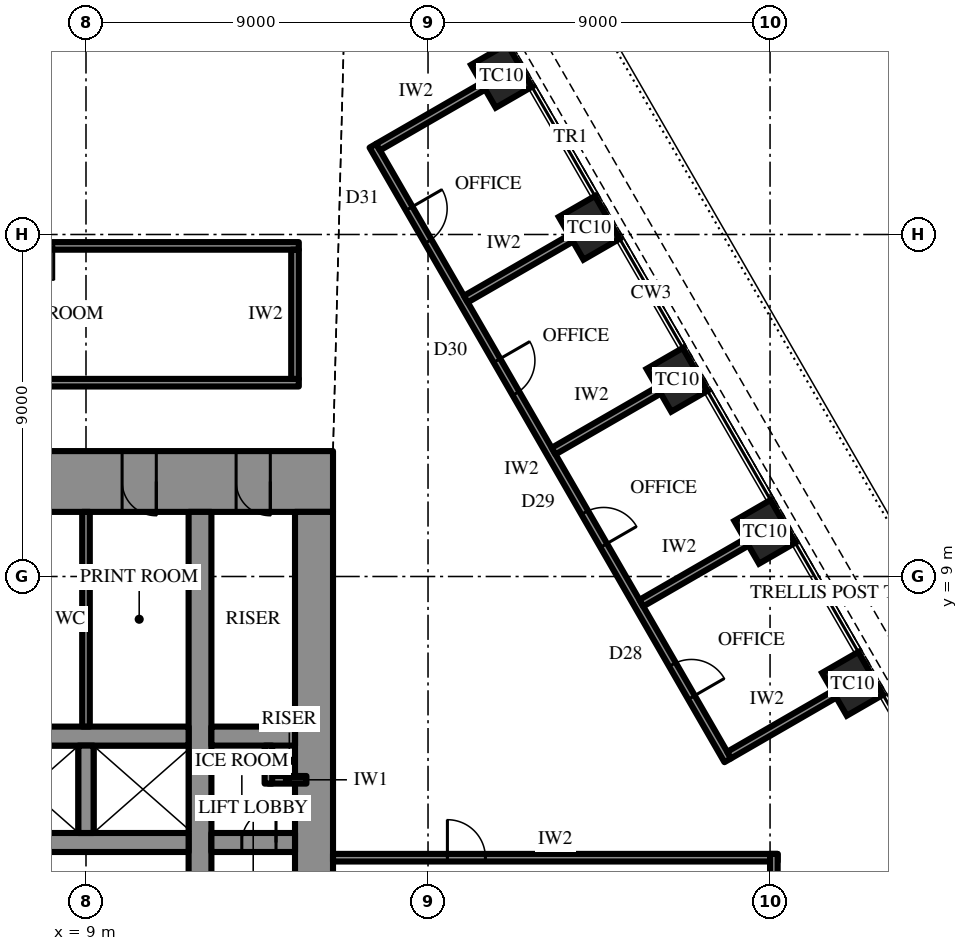
"""IFC4 building model, lengths in metres.
Left out: names, types, materials, properties, quantities, classifications, styles, units other than length and angle.
Written with IfcOpenShell. Run it as: python <this file> out.ifc"""

import sys

from ifc_helpers import new_model, si_unit, direction, frame, frame_2d, origin, origin_2d, place, context, subcontext, project, spatial, rectangle, extrude, element, fill, save


model = new_model("IFC4")
c1 = context("Model", 3, precision=1e-05, world=origin(), true_north=direction((0.0, 1.0)))
c2 = subcontext(c1, "Body", "Model", "MODEL_VIEW")
j1 = project(units=[si_unit("LENGTHUNIT", "METRE"), si_unit("PLANEANGLEUNIT", "RADIAN")], contexts=[c1])
p1 = place(None, origin())
s1 = spatial("IfcSite", under=j1, at=p1, CompositionType="ELEMENT")
p2 = place(p1, origin())
s2 = spatial("IfcBuilding", under=s1, at=p2, CompositionType="ELEMENT")
p3 = place(p2, frame((0.0, 0.0, 240.7)))
s3 = spatial("IfcBuildingStorey", under=s2, at=p3, CompositionType="ELEMENT", Elevation=240.7)
for number, where, z_axis, x_axis in (
    (1, (29.171, 6.175, 0.0), (0.0, 0.0, 1.0), (-0.5, 0.866, 0.0)),
    (2, (26.861, 10.175, 0.0), (0.0, 0.0, 1.0), (-0.5, 0.866, 0.0)),
    (3, (24.552, 14.175, 0.0), (0.0, 0.0, 1.0), (-0.5, 0.866, 0.0)),
    (4, (22.242, 18.175, 0.0), (0.0, 0.0, 1.0), (-0.5, 0.866, 0.0)),
    (5, (19.933, 22.175, 0.0), (0.0, 0.0, 1.0), (-0.5, 0.866, 0.0)),
):
    element("IfcColumn", number, at=place(p3, frame(where, z_axis=z_axis, x_axis=x_axis)), inside=s3, PredefinedType="COLUMN", context=c2, shape_type="SweptSolid", body=[
        extrude(rectangle(XDim=1.3, YDim=1.1, at=origin_2d()), origin(), (0.0, 0.0, 1.0), 4.2),
    ])
p4 = place(p3, frame((-15.5, 11.5, 0.0), z_axis=(0.0, 0.0, 1.0), x_axis=(1.0, 0.0, 0.0)))
e6 = element("IfcWall", 6, at=p4, inside=s3, PredefinedType="SHEAR", context=c2, shape_type="SweptSolid", body=[
    extrude(rectangle(XDim=31.0, YDim=1.6, at=frame_2d((15.5, 0.0))), origin(), (0.0, 0.0, 1.0), 4.2),
])
p5 = place(p4, frame((16.35, 0.0, 0.0)))
e7 = element("IfcOpeningElement", 7, at=p5, cuts=e6, PredefinedType="OPENING", context=c2, shape_type="SweptSolid", body=[
    extrude(rectangle(XDim=0.9, YDim=2.2, at=frame_2d((0.45, 1.1))), frame((0.0, 0.81, 0.0), z_axis=(0.0, -1.0, 0.0), x_axis=(1.0, 0.0, 0.0)), (0.0, 0.0, 1.0), 1.62),
])
p6 = place(p4, frame((19.35, 0.0, 0.0)))
e8 = element("IfcOpeningElement", 8, at=p6, cuts=e6, PredefinedType="OPENING", context=c2, shape_type="SweptSolid", body=[
    extrude(rectangle(XDim=0.9, YDim=2.2, at=frame_2d((0.45, 1.1))), frame((0.0, 0.81, 0.0), z_axis=(0.0, -1.0, 0.0), x_axis=(1.0, 0.0, 0.0)), (0.0, 0.0, 1.0), 1.62),
])
p7 = place(p4, frame((22.4, 0.0, 0.0)))
e9 = element("IfcOpeningElement", 9, at=p7, cuts=e6, PredefinedType="OPENING", context=c2, shape_type="SweptSolid", body=[
    extrude(rectangle(XDim=1.0, YDim=2.2, at=frame_2d((0.5, 1.1))), frame((0.0, 0.81, 0.0), z_axis=(0.0, -1.0, 0.0), x_axis=(1.0, 0.0, 0.0)), (0.0, 0.0, 1.0), 1.62),
])
p8 = place(p4, frame((1.65, 0.0, 0.0)))
e10 = element("IfcOpeningElement", 10, at=p8, cuts=e6, PredefinedType="OPENING", context=c2, shape_type="SweptSolid", body=[
    extrude(rectangle(XDim=0.9, YDim=2.2, at=frame_2d((0.45, 1.1))), frame((0.0, 0.81, 0.0), z_axis=(0.0, -1.0, 0.0), x_axis=(1.0, 0.0, 0.0)), (0.0, 0.0, 1.0), 1.62),
])
p9 = place(p4, frame((4.65, 0.0, 0.0)))
e11 = element("IfcOpeningElement", 11, at=p9, cuts=e6, PredefinedType="OPENING", context=c2, shape_type="SweptSolid", body=[
    extrude(rectangle(XDim=0.9, YDim=2.2, at=frame_2d((0.45, 1.1))), frame((0.0, 0.81, 0.0), z_axis=(0.0, -1.0, 0.0), x_axis=(1.0, 0.0, 0.0)), (0.0, 0.0, 1.0), 1.62),
])
p10 = place(p4, frame((25.45, 0.0, 0.0)))
e12 = element("IfcOpeningElement", 12, at=p10, cuts=e6, PredefinedType="OPENING", context=c2, shape_type="SweptSolid", body=[
    extrude(rectangle(XDim=0.9, YDim=2.2, at=frame_2d((0.45, 1.1))), frame((0.0, 0.81, 0.0), z_axis=(0.0, -1.0, 0.0), x_axis=(1.0, 0.0, 0.0)), (0.0, 0.0, 1.0), 1.62),
])
p11 = place(p4, frame((28.45, 0.0, 0.0)))
e13 = element("IfcOpeningElement", 13, at=p11, cuts=e6, PredefinedType="OPENING", context=c2, shape_type="SweptSolid", body=[
    extrude(rectangle(XDim=0.9, YDim=2.2, at=frame_2d((0.45, 1.1))), frame((0.0, 0.81, 0.0), z_axis=(0.0, -1.0, 0.0), x_axis=(1.0, 0.0, 0.0)), (0.0, 0.0, 1.0), 1.62),
])
p12 = place(p3, frame((15.0, -10.7, 0.0), z_axis=(0.0, 0.0, 1.0), x_axis=(0.0, 1.0, 0.0)))
e14 = element("IfcWall", 14, at=p12, inside=s3, PredefinedType="SHEAR", context=c2, shape_type="SweptSolid", body=[
    extrude(rectangle(XDim=21.4, YDim=1.0, at=frame_2d((10.7, 0.0))), origin(), (0.0, 0.0, 1.0), 4.2),
])
p13 = place(p12, frame((9.8, 0.0, 0.0)))
e15 = element("IfcOpeningElement", 15, at=p13, cuts=e14, PredefinedType="OPENING", context=c2, shape_type="SweptSolid", body=[
    extrude(rectangle(XDim=1.8, YDim=2.4, at=frame_2d((0.9, 1.2))), frame((0.0, 0.51, 0.0), z_axis=(0.0, -1.0, 0.0), x_axis=(1.0, 0.0, 0.0)), (0.0, 0.0, 1.0), 1.02),
])
p14 = place(p3, frame((12.0, -10.7, 0.0), z_axis=(0.0, 0.0, 1.0), x_axis=(0.0, 1.0, 0.0)))
e16 = element("IfcWall", 16, at=p14, inside=s3, PredefinedType="SHEAR", context=c2, shape_type="SweptSolid", body=[
    extrude(rectangle(XDim=21.4, YDim=0.6, at=frame_2d((10.7, 0.0))), origin(), (0.0, 0.0, 1.0), 4.2),
])
p15 = place(p14, frame((9.8, 0.0, 0.0)))
e17 = element("IfcOpeningElement", 17, at=p15, cuts=e16, PredefinedType="OPENING", context=c2, shape_type="SweptSolid", body=[
    extrude(rectangle(XDim=1.8, YDim=2.4, at=frame_2d((0.9, 1.2))), frame((0.0, 0.31, 0.0), z_axis=(0.0, -1.0, 0.0), x_axis=(1.0, 0.0, 0.0)), (0.0, 0.0, 1.0), 0.62),
])
p16 = place(p3, frame((-3.2, 2.0, 0.0), z_axis=(0.0, 0.0, 1.0), x_axis=(1.0, 0.0, 0.0)))
e18 = element("IfcWall", 18, at=p16, inside=s3, PredefinedType="SHEAR", context=c2, shape_type="SweptSolid", body=[
    extrude(rectangle(XDim=14.9, YDim=0.5, at=frame_2d((7.45, 0.0))), origin(), (0.0, 0.0, 1.0), 4.2),
])
p17 = place(p16, frame((1.15, 0.0, 0.0)))
e19 = element("IfcOpeningElement", 19, at=p17, cuts=e18, PredefinedType="OPENING", context=c2, shape_type="SweptSolid", body=[
    extrude(rectangle(XDim=1.1, YDim=2.2, at=frame_2d((0.55, 1.1))), frame((0.0, 0.26, 0.0), z_axis=(0.0, -1.0, 0.0), x_axis=(1.0, 0.0, 0.0)), (0.0, 0.0, 1.0), 0.52),
])
p18 = place(p16, frame((4.15, 0.0, 0.0)))
e20 = element("IfcOpeningElement", 20, at=p18, cuts=e18, PredefinedType="OPENING", context=c2, shape_type="SweptSolid", body=[
    extrude(rectangle(XDim=1.1, YDim=2.2, at=frame_2d((0.55, 1.1))), frame((0.0, 0.26, 0.0), z_axis=(0.0, -1.0, 0.0), x_axis=(1.0, 0.0, 0.0)), (0.0, 0.0, 1.0), 0.52),
])
p19 = place(p16, frame((7.15, 0.0, 0.0)))
e21 = element("IfcOpeningElement", 21, at=p19, cuts=e18, PredefinedType="OPENING", context=c2, shape_type="SweptSolid", body=[
    extrude(rectangle(XDim=1.1, YDim=2.2, at=frame_2d((0.55, 1.1))), frame((0.0, 0.26, 0.0), z_axis=(0.0, -1.0, 0.0), x_axis=(1.0, 0.0, 0.0)), (0.0, 0.0, 1.0), 0.52),
])
p20 = place(p16, frame((10.15, 0.0, 0.0)))
e22 = element("IfcOpeningElement", 22, at=p20, cuts=e18, PredefinedType="OPENING", context=c2, shape_type="SweptSolid", body=[
    extrude(rectangle(XDim=1.1, YDim=2.2, at=frame_2d((0.55, 1.1))), frame((0.0, 0.26, 0.0), z_axis=(0.0, -1.0, 0.0), x_axis=(1.0, 0.0, 0.0)), (0.0, 0.0, 1.0), 0.52),
])
p21 = place(p3, frame((12.3, 2.0, 0.0), z_axis=(0.0, 0.0, 1.0), x_axis=(1.0, 0.0, 0.0)))
e23 = element("IfcWall", 23, at=p21, inside=s3, PredefinedType="SHEAR", context=c2, shape_type="SweptSolid", body=[
    extrude(rectangle(XDim=2.2, YDim=0.5, at=frame_2d((1.1, 0.0))), origin(), (0.0, 0.0, 1.0), 4.2),
])
p22 = place(p21, frame((0.8, 0.0, 0.0)))
e24 = element("IfcOpeningElement", 24, at=p22, cuts=e23, PredefinedType="OPENING", context=c2, shape_type="SweptSolid", body=[
    extrude(rectangle(XDim=0.9, YDim=2.2, at=frame_2d((0.45, 1.1))), frame((0.0, 0.26, 0.0), z_axis=(0.0, -1.0, 0.0), x_axis=(1.0, 0.0, 0.0)), (0.0, 0.0, 1.0), 0.52),
])
p23 = place(p3, frame((-11.7, 4.8, 0.0), z_axis=(0.0, 0.0, 1.0), x_axis=(1.0, 0.0, 0.0)))
e25 = element("IfcWall", 25, at=p23, inside=s3, PredefinedType="SHEAR", context=c2, shape_type="SweptSolid", body=[
    extrude(rectangle(XDim=23.4, YDim=0.5, at=frame_2d((11.7, 0.0))), origin(), (0.0, 0.0, 1.0), 4.2),
])
p24 = place(p23, frame((6.6, 0.0, 0.0)))
e26 = element("IfcOpeningElement", 26, at=p24, cuts=e25, PredefinedType="OPENING", context=c2, shape_type="SweptSolid", body=[
    extrude(rectangle(XDim=1.2, YDim=2.2, at=frame_2d((0.6, 1.1))), frame((0.0, 0.26, 0.0), z_axis=(0.0, -1.0, 0.0), x_axis=(1.0, 0.0, 0.0)), (0.0, 0.0, 1.0), 0.52),
])
p25 = place(p23, frame((3.6, 0.0, 0.0)))
e27 = element("IfcOpeningElement", 27, at=p25, cuts=e25, PredefinedType="OPENING", context=c2, shape_type="SweptSolid", body=[
    extrude(rectangle(XDim=1.2, YDim=2.2, at=frame_2d((0.6, 1.1))), frame((0.0, 0.26, 0.0), z_axis=(0.0, -1.0, 0.0), x_axis=(1.0, 0.0, 0.0)), (0.0, 0.0, 1.0), 0.52),
])
p26 = place(p3, frame((12.3, 4.8, 0.0), z_axis=(0.0, 0.0, 1.0), x_axis=(1.0, 0.0, 0.0)))
e28 = element("IfcWall", 28, at=p26, inside=s3, PredefinedType="SHEAR", context=c2, shape_type="SweptSolid", body=[
    extrude(rectangle(XDim=2.2, YDim=0.5, at=frame_2d((1.1, 0.0))), origin(), (0.0, 0.0, 1.0), 4.2),
])
p27 = place(p3, frame((9.0, 2.25, 0.0), z_axis=(0.0, 0.0, 1.0), x_axis=(0.0, 1.0, 0.0)))
e29 = element("IfcWall", 29, at=p27, inside=s3, PredefinedType="SHEAR", context=c2, shape_type="SweptSolid", body=[
    extrude(rectangle(XDim=2.3, YDim=0.4, at=frame_2d((1.15, 0.0))), origin(), (0.0, 0.0, 1.0), 4.2),
])
p28 = place(p3, frame((9.0, 5.05, 0.0), z_axis=(0.0, 0.0, 1.0), x_axis=(0.0, 1.0, 0.0)))
e30 = element("IfcWall", 30, at=p28, inside=s3, PredefinedType="PARTITIONING", context=c2, shape_type="SweptSolid", body=[
    extrude(rectangle(XDim=5.65, YDim=0.2, at=frame_2d((2.825, 0.0))), origin(), (0.0, 0.0, 1.0), 4.0),
])
for number, where, z_axis, x_axis in (
    (31, (13.8, 3.65, 0.0), (0.0, 0.0, 1.0), (1.0, 0.0, 0.0)),
    (32, (13.8, 3.55, 0.0), (0.0, 0.0, 1.0), (0.0, 1.0, 0.0)),
):
    element("IfcWall", number, at=place(p3, frame(where, z_axis=z_axis, x_axis=x_axis)), inside=s3, PredefinedType="PARTITIONING", context=c2, shape_type="SweptSolid", body=[
        extrude(rectangle(XDim=1.0, YDim=0.2, at=frame_2d((0.5, 0.0))), origin(), (0.0, 0.0, 1.0), 4.0),
    ])
p29 = place(p3, frame((-14.6, 14.1, 0.0), z_axis=(0.0, 0.0, 1.0), x_axis=(1.0, 0.0, 0.0)))
e33 = element("IfcWall", 33, at=p29, inside=s3, PredefinedType="PARTITIONING", context=c2, shape_type="SweptSolid", body=[
    extrude(rectangle(XDim=29.2, YDim=0.2, at=frame_2d((14.6, 0.0))), origin(), (0.0, 0.0, 1.0), 4.0),
])
p30 = place(p3, frame((-14.6, 17.7, 0.0), z_axis=(0.0, 0.0, 1.0), x_axis=(1.0, 0.0, 0.0)))
e34 = element("IfcWall", 34, at=p30, inside=s3, PredefinedType="PARTITIONING", context=c2, shape_type="SweptSolid", body=[
    extrude(rectangle(XDim=29.2, YDim=0.2, at=frame_2d((14.6, 0.0))), origin(), (0.0, 0.0, 1.0), 4.0),
])
p31 = place(p30, frame((6.45, 0.0, 0.0)))
e35 = element("IfcOpeningElement", 35, at=p31, cuts=e34, PredefinedType="OPENING", context=c2, shape_type="SweptSolid", body=[
    extrude(rectangle(XDim=1.8, YDim=2.4, at=frame_2d((0.9, 1.2))), frame((0.0, 0.11, 0.0), z_axis=(0.0, -1.0, 0.0), x_axis=(1.0, 0.0, 0.0)), (0.0, 0.0, 1.0), 0.22),
])
p32 = place(p30, frame((20.95, 0.0, 0.0)))
e36 = element("IfcOpeningElement", 36, at=p32, cuts=e34, PredefinedType="OPENING", context=c2, shape_type="SweptSolid", body=[
    extrude(rectangle(XDim=1.8, YDim=2.4, at=frame_2d((0.9, 1.2))), frame((0.0, 0.11, 0.0), z_axis=(0.0, -1.0, 0.0), x_axis=(1.0, 0.0, 0.0)), (0.0, 0.0, 1.0), 0.22),
])
p33 = place(p3, frame((14.5, 14.2, 0.0), z_axis=(0.0, 0.0, 1.0), x_axis=(0.0, 1.0, 0.0)))
e37 = element("IfcWall", 37, at=p33, inside=s3, PredefinedType="PARTITIONING", context=c2, shape_type="SweptSolid", body=[
    extrude(rectangle(XDim=3.4, YDim=0.2, at=frame_2d((1.7, 0.0))), origin(), (0.0, 0.0, 1.0), 4.0),
])
p34 = place(p3, frame((25.886, 4.163, 0.0), z_axis=(0.0, 0.0, 1.0), x_axis=(-0.499998569178, 0.866026229868, 0.0)))
e38 = element("IfcWall", 38, at=p34, inside=s3, PredefinedType="PARTITIONING", context=c2, shape_type="SweptSolid", body=[
    extrude(rectangle(XDim=18.675, YDim=0.2, at=frame_2d((9.338, 0.0))), origin(), (0.0, 0.0, 1.0), 4.0),
])
p35 = place(p34, frame((1.909, 0.0, 0.0)))
e39 = element("IfcOpeningElement", 39, at=p35, cuts=e38, PredefinedType="OPENING", context=c2, shape_type="SweptSolid", body=[
    extrude(rectangle(XDim=1.0, YDim=2.2, at=frame_2d((0.5, 1.1))), frame((0.0, 0.11, 0.0), z_axis=(0.0, -1.0, 0.0), x_axis=(1.0, 0.0, 0.0)), (0.0, 0.0, 1.0), 0.22),
])
p36 = place(p34, frame((6.528, 0.0, 0.0)))
e40 = element("IfcOpeningElement", 40, at=p36, cuts=e38, PredefinedType="OPENING", context=c2, shape_type="SweptSolid", body=[
    extrude(rectangle(XDim=1.0, YDim=2.2, at=frame_2d((0.5, 1.1))), frame((0.0, 0.11, 0.0), z_axis=(0.0, -1.0, 0.0), x_axis=(1.0, 0.0, 0.0)), (0.0, 0.0, 1.0), 0.22),
])
p37 = place(p34, frame((11.147, 0.0, 0.0)))
e41 = element("IfcOpeningElement", 41, at=p37, cuts=e38, PredefinedType="OPENING", context=c2, shape_type="SweptSolid", body=[
    extrude(rectangle(XDim=1.0, YDim=2.2, at=frame_2d((0.5, 1.1))), frame((0.0, 0.11, 0.0), z_axis=(0.0, -1.0, 0.0), x_axis=(1.0, 0.0, 0.0)), (0.0, 0.0, 1.0), 0.22),
])
p38 = place(p34, frame((15.766, 0.0, 0.0)))
e42 = element("IfcOpeningElement", 42, at=p38, cuts=e38, PredefinedType="OPENING", context=c2, shape_type="SweptSolid", body=[
    extrude(rectangle(XDim=1.0, YDim=2.2, at=frame_2d((0.5, 1.1))), frame((0.0, 0.11, 0.0), z_axis=(0.0, -1.0, 0.0), x_axis=(1.0, 0.0, 0.0)), (0.0, 0.0, 1.0), 0.22),
])
p39 = place(p3, frame((25.923, 4.3, 0.0), z_axis=(0.0, 0.0, 1.0), x_axis=(0.866042017984, 0.499971222258, 0.0)))
e43 = element("IfcWall", 43, at=p39, inside=s3, PredefinedType="PARTITIONING", context=c2, shape_type="SweptSolid", body=[
    extrude(rectangle(XDim=3.2, YDim=0.2, at=frame_2d((1.6, 0.0))), origin(), (0.0, 0.0, 1.0), 3.082),
])
p40 = place(p3, frame((23.614, 8.3, 0.0), z_axis=(0.0, 0.0, 1.0), x_axis=(0.866061088033, 0.499938187974, 0.0)))
e44 = element("IfcWall", 44, at=p40, inside=s3, PredefinedType="PARTITIONING", context=c2, shape_type="SweptSolid", body=[
    extrude(rectangle(XDim=3.2, YDim=0.2, at=frame_2d((1.6, 0.0))), origin(), (0.0, 0.0, 1.0), 3.082),
])
for number, where, z_axis, x_axis in (
    (45, (21.304, 12.3, 0.0), (0.0, 0.0, 1.0), (0.866, 0.5, 0.0)),
    (46, (18.995, 16.3, 0.0), (0.0, 0.0, 1.0), (0.866, 0.5, 0.0)),
):
    element("IfcWall", number, at=place(p3, frame(where, z_axis=z_axis, x_axis=x_axis)), inside=s3, PredefinedType="PARTITIONING", context=c2, shape_type="SweptSolid", body=[
        extrude(rectangle(XDim=3.2, YDim=0.2, at=frame_2d((1.6, 0.0))), origin(), (0.0, 0.0, 1.0), 3.082),
    ])
p41 = place(p3, frame((16.685, 20.3, 0.0), z_axis=(0.0, 0.0, 1.0), x_axis=(0.866061088033, 0.499938187974, 0.0)))
e47 = element("IfcWall", 47, at=p41, inside=s3, PredefinedType="PARTITIONING", context=c2, shape_type="SweptSolid", body=[
    extrude(rectangle(XDim=3.2, YDim=0.2, at=frame_2d((1.6, 0.0))), origin(), (0.0, 0.0, 1.0), 3.082),
])
p42 = place(p3, frame((15.5, 1.6, 0.0), z_axis=(0.0, 0.0, 1.0), x_axis=(1.0, 0.0, 0.0)))
e48 = element("IfcWall", 48, at=p42, inside=s3, PredefinedType="PARTITIONING", context=c2, shape_type="SweptSolid", body=[
    extrude(rectangle(XDim=11.7, YDim=0.2, at=frame_2d((5.85, 0.0))), origin(), (0.0, 0.0, 1.0), 4.0),
])
p43 = place(p42, frame((3.01, 0.0, 0.0)))
e49 = element("IfcOpeningElement", 49, at=p43, cuts=e48, PredefinedType="OPENING", context=c2, shape_type="SweptSolid", body=[
    extrude(rectangle(XDim=1.0, YDim=2.2, at=frame_2d((0.5, 1.1))), frame((0.0, 0.11, 0.0), z_axis=(0.0, -1.0, 0.0), x_axis=(1.0, 0.0, 0.0)), (0.0, 0.0, 1.0), 0.22),
])
p44 = place(p3, frame((27.1, -1.7, 0.0), z_axis=(0.0, 0.0, 1.0), x_axis=(0.0, 1.0, 0.0)))
e50 = element("IfcWall", 50, at=p44, inside=s3, PredefinedType="PARTITIONING", context=c2, shape_type="SweptSolid", body=[
    extrude(rectangle(XDim=3.4, YDim=0.2, at=frame_2d((1.7, 0.0))), origin(), (0.0, 0.0, 1.0), 4.0),
])
p45 = place(p44, frame((1.2, 0.0, 0.0)))
e51 = element("IfcOpeningElement", 51, at=p45, cuts=e50, PredefinedType="OPENING", context=c2, shape_type="SweptSolid", body=[
    extrude(rectangle(XDim=1.0, YDim=2.2, at=frame_2d((0.5, 1.1))), frame((0.0, 0.11, 0.0), z_axis=(0.0, -1.0, 0.0), x_axis=(1.0, 0.0, 0.0)), (0.0, 0.0, 1.0), 0.22),
])
p46 = place(p10, frame((0.9, 0.0, 0.0), z_axis=(0.0, 0.0, 1.0), x_axis=(-1.0, 0.0, 0.0)))
e52 = element("IfcDoor", 52, at=p46, inside=s3, OperationType="SINGLE_SWING_RIGHT", PredefinedType="DOOR", context=c2, shape_type="SweptSolid", body=[
    extrude(rectangle(XDim=0.9, YDim=2.2, at=frame_2d((0.45, 1.1))), frame((0.0, 0.025, 0.0), z_axis=(0.0, -1.0, 0.0), x_axis=(1.0, 0.0, 0.0)), (0.0, 0.0, 1.0), 0.05),
])
fill(e12, e52)
p47 = place(p11, frame((0.9, 0.0, 0.0), z_axis=(0.0, 0.0, 1.0), x_axis=(-1.0, 0.0, 0.0)))
e53 = element("IfcDoor", 53, at=p47, inside=s3, OperationType="SINGLE_SWING_RIGHT", PredefinedType="DOOR", context=c2, shape_type="SweptSolid", body=[
    extrude(rectangle(XDim=0.9, YDim=2.2, at=frame_2d((0.45, 1.1))), frame((0.0, 0.025, 0.0), z_axis=(0.0, -1.0, 0.0), x_axis=(1.0, 0.0, 0.0)), (0.0, 0.0, 1.0), 0.05),
])
fill(e13, e53)
p48 = place(p22, origin())
e54 = element("IfcDoor", 54, at=p48, inside=s3, OperationType="SINGLE_SWING_LEFT", PredefinedType="DOOR", context=c2, shape_type="SweptSolid", body=[
    extrude(rectangle(XDim=0.9, YDim=2.2, at=frame_2d((0.45, 1.1))), frame((0.0, 0.025, 0.0), z_axis=(0.0, -1.0, 0.0), x_axis=(1.0, 0.0, 0.0)), (0.0, 0.0, 1.0), 0.05),
])
fill(e24, e54)
p49 = place(p32, frame((1.8, 0.0, 0.0), z_axis=(0.0, 0.0, 1.0), x_axis=(-1.0, 0.0, 0.0)))
e55 = element("IfcDoor", 55, at=p49, inside=s3, OperationType="DOUBLE_DOOR_SINGLE_SWING", PredefinedType="DOOR", context=c2, shape_type="SweptSolid", body=[
    extrude(rectangle(XDim=1.8, YDim=2.4, at=frame_2d((0.9, 1.2))), frame((0.0, 0.025, 0.0), z_axis=(0.0, -1.0, 0.0), x_axis=(1.0, 0.0, 0.0)), (0.0, 0.0, 1.0), 0.05),
])
fill(e36, e55)
p50 = place(p35, frame((1.0, 0.0, 0.0), z_axis=(0.0, 0.0, 1.0), x_axis=(-1.0, 0.0, 0.0)))
e56 = element("IfcDoor", 56, at=p50, inside=s3, OperationType="SINGLE_SWING_LEFT", PredefinedType="DOOR", context=c2, shape_type="SweptSolid", body=[
    extrude(rectangle(XDim=1.0, YDim=2.2, at=frame_2d((0.5, 1.1))), frame((0.0, 0.025, 0.0), z_axis=(0.0, -1.0, 0.0), x_axis=(1.0, 0.0, 0.0)), (0.0, 0.0, 1.0), 0.05),
])
fill(e39, e56)
p51 = place(p36, frame((1.0, 0.0, 0.0), z_axis=(0.0, 0.0, 1.0), x_axis=(-1.0, 0.0, 0.0)))
e57 = element("IfcDoor", 57, at=p51, inside=s3, OperationType="SINGLE_SWING_LEFT", PredefinedType="DOOR", context=c2, shape_type="SweptSolid", body=[
    extrude(rectangle(XDim=1.0, YDim=2.2, at=frame_2d((0.5, 1.1))), frame((0.0, 0.025, 0.0), z_axis=(0.0, -1.0, 0.0), x_axis=(1.0, 0.0, 0.0)), (0.0, 0.0, 1.0), 0.05),
])
fill(e40, e57)
p52 = place(p37, frame((1.0, 0.0, 0.0), z_axis=(0.0, 0.0, 1.0), x_axis=(-1.0, 0.0, 0.0)))
e58 = element("IfcDoor", 58, at=p52, inside=s3, OperationType="SINGLE_SWING_RIGHT", PredefinedType="DOOR", context=c2, shape_type="SweptSolid", body=[
    extrude(rectangle(XDim=1.0, YDim=2.2, at=frame_2d((0.5, 1.1))), frame((0.0, 0.025, 0.0), z_axis=(0.0, -1.0, 0.0), x_axis=(1.0, 0.0, 0.0)), (0.0, 0.0, 1.0), 0.05),
])
fill(e41, e58)
p53 = place(p38, frame((1.0, 0.0, 0.0), z_axis=(0.0, 0.0, 1.0), x_axis=(-1.0, 0.0, 0.0)))
e59 = element("IfcDoor", 59, at=p53, inside=s3, OperationType="SINGLE_SWING_RIGHT", PredefinedType="DOOR", context=c2, shape_type="SweptSolid", body=[
    extrude(rectangle(XDim=1.0, YDim=2.2, at=frame_2d((0.5, 1.1))), frame((0.0, 0.025, 0.0), z_axis=(0.0, -1.0, 0.0), x_axis=(1.0, 0.0, 0.0)), (0.0, 0.0, 1.0), 0.05),
])
fill(e42, e59)
p54 = place(p43, origin())
e60 = element("IfcDoor", 60, at=p54, inside=s3, OperationType="SINGLE_SWING_RIGHT", PredefinedType="DOOR", context=c2, shape_type="SweptSolid", body=[
    extrude(rectangle(XDim=1.0, YDim=2.2, at=frame_2d((0.5, 1.1))), frame((0.0, 0.025, 0.0), z_axis=(0.0, -1.0, 0.0), x_axis=(1.0, 0.0, 0.0)), (0.0, 0.0, 1.0), 0.05),
])
fill(e49, e60)
save(model, sys.argv[1])
